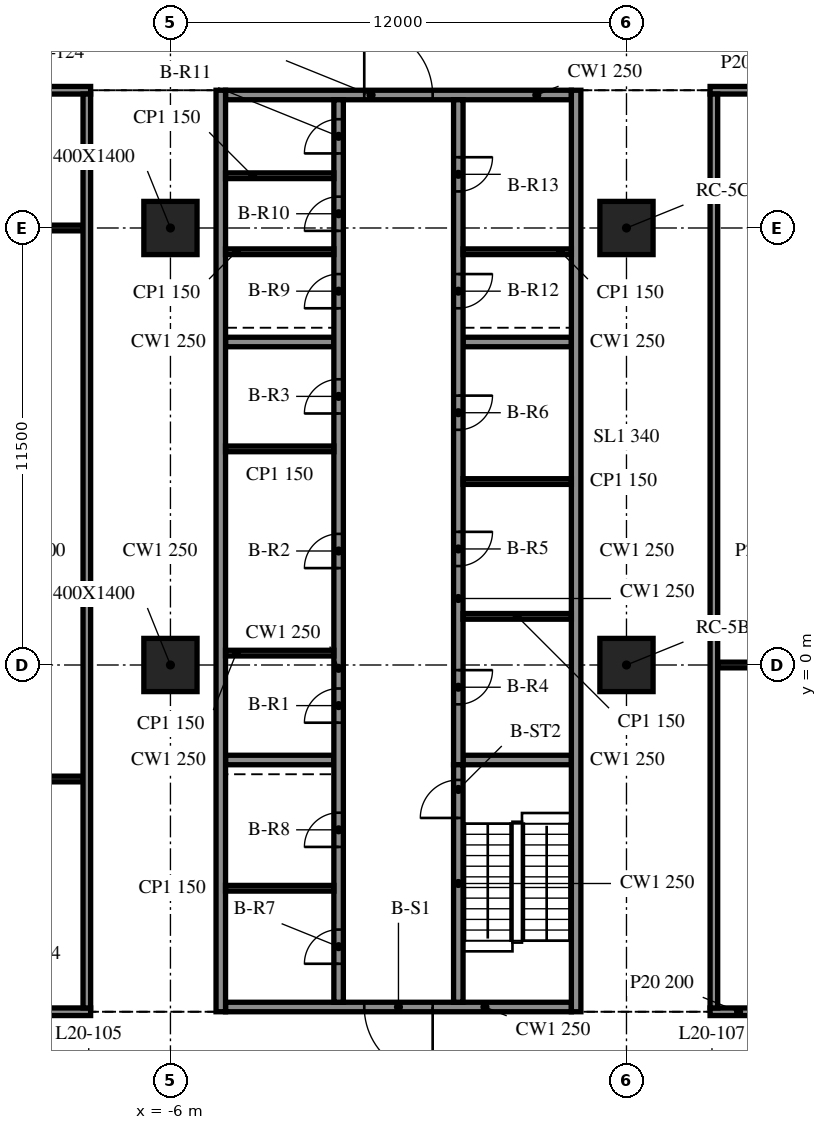
"""IFC4 building model, lengths in metres.
Left out: names, types, materials, properties, quantities, classifications, styles, units other than length and angle.
Written with IfcOpenShell. Run it as: python <this file> out.ifc"""

import sys

from ifc_helpers import new_model, si_unit, direction, frame, frame_2d, origin, origin_2d, place, context, subcontext, project, spatial, rectangle, extrude, element, fill, save


model = new_model("IFC4")
c1 = context("Model", 3, precision=1e-05, world=origin(), true_north=direction((0.0, 1.0)))
c2 = subcontext(c1, "Body", "Model", "MODEL_VIEW")
j1 = project(units=[si_unit("LENGTHUNIT", "METRE"), si_unit("PLANEANGLEUNIT", "RADIAN")], contexts=[c1])
p1 = place(None, origin())
s1 = spatial("IfcSite", under=j1, at=p1, CompositionType="ELEMENT")
p2 = place(p1, origin())
s2 = spatial("IfcBuilding", under=s1, at=p2, CompositionType="ELEMENT")
p3 = place(p2, frame((0.0, 0.0, 88.9)))
s3 = spatial("IfcBuildingStorey", under=s2, at=p3, CompositionType="ELEMENT", Elevation=88.9)
for number, where, z_axis, x_axis in (
    (1, (-6.0, 0.0, -0.34), (0.0, 0.0, 1.0), (1.0, 0.0, 0.0)),
    (2, (-6.0, 11.5, -0.34), (0.0, 0.0, 1.0), (1.0, 0.0, 0.0)),
    (3, (6.0, 0.0, -0.34), (0.0, 0.0, 1.0), (1.0, 0.0, 0.0)),
    (4, (6.0, 11.5, -0.34), (0.0, 0.0, 1.0), (1.0, 0.0, 0.0)),
):
    element("IfcColumn", number, at=place(p3, frame(where, z_axis=z_axis, x_axis=x_axis)), inside=s3, PredefinedType="COLUMN", context=c2, shape_type="SweptSolid", body=[
        extrude(rectangle(XDim=1.4, YDim=1.4, at=origin_2d()), origin(), (0.0, 0.0, 1.0), 4.1),
    ])
for number, where, z_axis, x_axis in (
    (5, (-4.675, 15.125, 0.0), (0.0, 0.0, 1.0), (0.0, -1.0, 0.0)),
    (6, (4.675, -9.125, 0.0), (0.0, 0.0, 1.0), (0.0, 1.0, 0.0)),
):
    element("IfcWall", number, at=place(p3, frame(where, z_axis=z_axis, x_axis=x_axis)), inside=s3, PredefinedType="SOLIDWALL", context=c2, shape_type="SweptSolid", body=[
        extrude(rectangle(XDim=24.25, YDim=0.25, at=frame_2d((12.125, 0.0))), origin(), (0.0, 0.0, 1.0), 3.76),
    ])
p4 = place(p3, frame((4.55, -9.0, 0.0), z_axis=(0.0, 0.0, 1.0), x_axis=(-1.0, 0.0, 0.0)))
e7 = element("IfcWall", 7, at=p4, inside=s3, PredefinedType="SOLIDWALL", context=c2, shape_type="SweptSolid", body=[
    extrude(rectangle(XDim=9.1, YDim=0.25, at=frame_2d((4.55, 0.0))), origin(), (0.0, 0.0, 1.0), 3.76),
])
p5 = place(p4, frame((3.65, 0.0, 0.0)))
e8 = element("IfcOpeningElement", 8, at=p5, cuts=e7, PredefinedType="OPENING", context=c2, shape_type="SweptSolid", body=[
    extrude(rectangle(XDim=1.8, YDim=2.1, at=frame_2d((0.9, 1.05))), frame((0.0, 0.135, 0.0), z_axis=(0.0, -1.0, 0.0), x_axis=(1.0, 0.0, 0.0)), (0.0, 0.0, 1.0), 0.27),
])
p6 = place(p3, frame((-4.55, 15.0, 0.0), z_axis=(0.0, 0.0, 1.0), x_axis=(1.0, 0.0, 0.0)))
e9 = element("IfcWall", 9, at=p6, inside=s3, PredefinedType="SOLIDWALL", context=c2, shape_type="SweptSolid", body=[
    extrude(rectangle(XDim=9.1, YDim=0.25, at=frame_2d((4.55, 0.0))), origin(), (0.0, 0.0, 1.0), 3.76),
])
p7 = place(p6, frame((3.65, 0.0, 0.0)))
e10 = element("IfcOpeningElement", 10, at=p7, cuts=e9, PredefinedType="OPENING", context=c2, shape_type="SweptSolid", body=[
    extrude(rectangle(XDim=1.8, YDim=2.1, at=frame_2d((0.9, 1.05))), frame((0.0, 0.135, 0.0), z_axis=(0.0, -1.0, 0.0), x_axis=(1.0, 0.0, 0.0)), (0.0, 0.0, 1.0), 0.27),
])
p8 = place(p3, frame((-1.575, -8.875, 0.0), z_axis=(0.0, 0.0, 1.0), x_axis=(0.0, 1.0, 0.0)))
e11 = element("IfcWall", 11, at=p8, inside=s3, PredefinedType="SOLIDWALL", context=c2, shape_type="SweptSolid", body=[
    extrude(rectangle(XDim=23.75, YDim=0.25, at=frame_2d((11.875, 0.0))), origin(), (0.0, 0.0, 1.0), 3.76),
])
p9 = place(p8, frame((7.356, 0.0, 0.0)))
e12 = element("IfcOpeningElement", 12, at=p9, cuts=e11, PredefinedType="OPENING", context=c2, shape_type="SweptSolid", body=[
    extrude(rectangle(XDim=0.9, YDim=2.1, at=frame_2d((0.45, 1.05))), frame((0.0, 0.135, 0.0), z_axis=(0.0, -1.0, 0.0), x_axis=(1.0, 0.0, 0.0)), (0.0, 0.0, 1.0), 0.27),
])
p10 = place(p8, frame((11.425, 0.0, 0.0)))
e13 = element("IfcOpeningElement", 13, at=p10, cuts=e11, PredefinedType="OPENING", context=c2, shape_type="SweptSolid", body=[
    extrude(rectangle(XDim=0.9, YDim=2.1, at=frame_2d((0.45, 1.05))), frame((0.0, 0.135, 0.0), z_axis=(0.0, -1.0, 0.0), x_axis=(1.0, 0.0, 0.0)), (0.0, 0.0, 1.0), 0.27),
])
p11 = place(p8, frame((15.494, 0.0, 0.0)))
e14 = element("IfcOpeningElement", 14, at=p11, cuts=e11, PredefinedType="OPENING", context=c2, shape_type="SweptSolid", body=[
    extrude(rectangle(XDim=0.9, YDim=2.1, at=frame_2d((0.45, 1.05))), frame((0.0, 0.135, 0.0), z_axis=(0.0, -1.0, 0.0), x_axis=(1.0, 0.0, 0.0)), (0.0, 0.0, 1.0), 0.27),
])
p12 = place(p8, frame((1.012, 0.0, 0.0)))
e15 = element("IfcOpeningElement", 15, at=p12, cuts=e11, PredefinedType="OPENING", context=c2, shape_type="SweptSolid", body=[
    extrude(rectangle(XDim=0.9, YDim=2.1, at=frame_2d((0.45, 1.05))), frame((0.0, 0.135, 0.0), z_axis=(0.0, -1.0, 0.0), x_axis=(1.0, 0.0, 0.0)), (0.0, 0.0, 1.0), 0.27),
])
p13 = place(p8, frame((4.087, 0.0, 0.0)))
e16 = element("IfcOpeningElement", 16, at=p13, cuts=e11, PredefinedType="OPENING", context=c2, shape_type="SweptSolid", body=[
    extrude(rectangle(XDim=0.9, YDim=2.1, at=frame_2d((0.45, 1.05))), frame((0.0, 0.135, 0.0), z_axis=(0.0, -1.0, 0.0), x_axis=(1.0, 0.0, 0.0)), (0.0, 0.0, 1.0), 0.27),
])
p14 = place(p8, frame((18.262, 0.0, 0.0)))
e17 = element("IfcOpeningElement", 17, at=p14, cuts=e11, PredefinedType="OPENING", context=c2, shape_type="SweptSolid", body=[
    extrude(rectangle(XDim=0.9, YDim=2.1, at=frame_2d((0.45, 1.05))), frame((0.0, 0.135, 0.0), z_axis=(0.0, -1.0, 0.0), x_axis=(1.0, 0.0, 0.0)), (0.0, 0.0, 1.0), 0.27),
])
p15 = place(p8, frame((20.3, 0.0, 0.0)))
e18 = element("IfcOpeningElement", 18, at=p15, cuts=e11, PredefinedType="OPENING", context=c2, shape_type="SweptSolid", body=[
    extrude(rectangle(XDim=0.9, YDim=2.1, at=frame_2d((0.45, 1.05))), frame((0.0, 0.135, 0.0), z_axis=(0.0, -1.0, 0.0), x_axis=(1.0, 0.0, 0.0)), (0.0, 0.0, 1.0), 0.27),
])
p16 = place(p8, frame((22.337, 0.0, 0.0)))
e19 = element("IfcOpeningElement", 19, at=p16, cuts=e11, PredefinedType="OPENING", context=c2, shape_type="SweptSolid", body=[
    extrude(rectangle(XDim=0.9, YDim=2.1, at=frame_2d((0.45, 1.05))), frame((0.0, 0.135, 0.0), z_axis=(0.0, -1.0, 0.0), x_axis=(1.0, 0.0, 0.0)), (0.0, 0.0, 1.0), 0.27),
])
p17 = place(p3, frame((1.575, -8.875, 0.0), z_axis=(0.0, 0.0, 1.0), x_axis=(0.0, 1.0, 0.0)))
e20 = element("IfcWall", 20, at=p17, inside=s3, PredefinedType="SOLIDWALL", context=c2, shape_type="SweptSolid", body=[
    extrude(rectangle(XDim=6.25, YDim=0.25, at=frame_2d((3.125, 0.0))), origin(), (0.0, 0.0, 1.0), 3.76),
])
p18 = place(p17, frame((4.85, 0.0, 0.0)))
e21 = element("IfcOpeningElement", 21, at=p18, cuts=e20, PredefinedType="OPENING", context=c2, shape_type="SweptSolid", body=[
    extrude(rectangle(XDim=1.0, YDim=2.1, at=frame_2d((0.5, 1.05))), frame((0.0, 0.135, 0.0), z_axis=(0.0, -1.0, 0.0), x_axis=(1.0, 0.0, 0.0)), (0.0, 0.0, 1.0), 0.27),
])
p19 = place(p3, frame((1.575, 14.875, 0.0), z_axis=(0.0, 0.0, 1.0), x_axis=(0.0, -1.0, 0.0)))
e22 = element("IfcWall", 22, at=p19, inside=s3, PredefinedType="SOLIDWALL", context=c2, shape_type="SweptSolid", body=[
    extrude(rectangle(XDim=17.5, YDim=0.25, at=frame_2d((8.75, 0.0))), origin(), (0.0, 0.0, 1.0), 3.76),
])
p20 = place(p19, frame((15.01, 0.0, 0.0)))
e23 = element("IfcOpeningElement", 23, at=p20, cuts=e22, PredefinedType="OPENING", context=c2, shape_type="SweptSolid", body=[
    extrude(rectangle(XDim=0.9, YDim=2.1, at=frame_2d((0.45, 1.05))), frame((0.0, 0.135, 0.0), z_axis=(0.0, -1.0, 0.0), x_axis=(1.0, 0.0, 0.0)), (0.0, 0.0, 1.0), 0.27),
])
p21 = place(p19, frame((11.371, 0.0, 0.0)))
e24 = element("IfcOpeningElement", 24, at=p21, cuts=e22, PredefinedType="OPENING", context=c2, shape_type="SweptSolid", body=[
    extrude(rectangle(XDim=0.9, YDim=2.1, at=frame_2d((0.45, 1.05))), frame((0.0, 0.135, 0.0), z_axis=(0.0, -1.0, 0.0), x_axis=(1.0, 0.0, 0.0)), (0.0, 0.0, 1.0), 0.27),
])
p22 = place(p19, frame((7.786, 0.0, 0.0)))
e25 = element("IfcOpeningElement", 25, at=p22, cuts=e22, PredefinedType="OPENING", context=c2, shape_type="SweptSolid", body=[
    extrude(rectangle(XDim=0.9, YDim=2.1, at=frame_2d((0.45, 1.05))), frame((0.0, 0.135, 0.0), z_axis=(0.0, -1.0, 0.0), x_axis=(1.0, 0.0, 0.0)), (0.0, 0.0, 1.0), 0.27),
])
p23 = place(p19, frame((4.587, 0.0, 0.0)))
e26 = element("IfcOpeningElement", 26, at=p23, cuts=e22, PredefinedType="OPENING", context=c2, shape_type="SweptSolid", body=[
    extrude(rectangle(XDim=0.9, YDim=2.1, at=frame_2d((0.45, 1.05))), frame((0.0, 0.135, 0.0), z_axis=(0.0, -1.0, 0.0), x_axis=(1.0, 0.0, 0.0)), (0.0, 0.0, 1.0), 0.27),
])
p24 = place(p19, frame((1.512, 0.0, 0.0)))
e27 = element("IfcOpeningElement", 27, at=p24, cuts=e22, PredefinedType="OPENING", context=c2, shape_type="SweptSolid", body=[
    extrude(rectangle(XDim=0.9, YDim=2.1, at=frame_2d((0.45, 1.05))), frame((0.0, 0.135, 0.0), z_axis=(0.0, -1.0, 0.0), x_axis=(1.0, 0.0, 0.0)), (0.0, 0.0, 1.0), 0.27),
])
for number, where, z_axis, x_axis in (
    (28, (-4.55, -2.5, 0.0), (0.0, 0.0, 1.0), (1.0, 0.0, 0.0)),
    (29, (-4.55, 8.5, 0.0), (0.0, 0.0, 1.0), (1.0, 0.0, 0.0)),
    (30, (1.7, -2.5, 0.0), (0.0, 0.0, 1.0), (1.0, 0.0, 0.0)),
    (31, (1.7, 8.5, 0.0), (0.0, 0.0, 1.0), (1.0, 0.0, 0.0)),
):
    element("IfcWall", number, at=place(p3, frame(where, z_axis=z_axis, x_axis=x_axis)), inside=s3, PredefinedType="SOLIDWALL", context=c2, shape_type="SweptSolid", body=[
        extrude(rectangle(XDim=2.85, YDim=0.25, at=frame_2d((1.425, 0.0))), origin(), (0.0, 0.0, 1.0), 3.76),
    ])
for number, where, z_axis, x_axis in (
    (32, (-4.55, 0.312, 0.0), (0.0, 0.0, 1.0), (1.0, 0.0, 0.0)),
    (33, (-4.55, 5.688, 0.0), (0.0, 0.0, 1.0), (1.0, 0.0, 0.0)),
    (34, (1.7, 1.28, 0.0), (0.0, 0.0, 1.0), (1.0, 0.0, 0.0)),
    (35, (1.7, 4.827, 0.0), (0.0, 0.0, 1.0), (1.0, 0.0, 0.0)),
    (36, (-4.55, -5.875, 0.0), (0.0, 0.0, 1.0), (1.0, 0.0, 0.0)),
    (37, (-4.55, 10.875, 0.0), (0.0, 0.0, 1.0), (1.0, 0.0, 0.0)),
    (38, (-4.55, 12.875, 0.0), (0.0, 0.0, 1.0), (1.0, 0.0, 0.0)),
    (39, (1.7, 10.875, 0.0), (0.0, 0.0, 1.0), (1.0, 0.0, 0.0)),
):
    element("IfcWall", number, at=place(p3, frame(where, z_axis=z_axis, x_axis=x_axis)), inside=s3, PredefinedType="PARTITIONING", context=c2, shape_type="SweptSolid", body=[
        extrude(rectangle(XDim=2.85, YDim=0.15, at=frame_2d((1.425, 0.0))), origin(), (0.0, 0.0, 1.0), 3.76),
    ])
p25 = place(p3, frame((-16.0, -9.125, 0.0), z_axis=(0.0, 0.0, 1.0), x_axis=(1.0, 0.0, 0.0)))
e40 = element("IfcWall", 40, at=p25, inside=s3, PredefinedType="PARTITIONING", context=c2, shape_type="SweptSolid", body=[
    extrude(rectangle(XDim=7.9, YDim=0.2, at=frame_2d((3.95, 0.0))), origin(), (0.0, 0.0, 1.0), 3.76),
])
p26 = place(p25, frame((3.5, 0.0, 0.0)))
e41 = element("IfcOpeningElement", 41, at=p26, cuts=e40, PredefinedType="OPENING", context=c2, shape_type="SweptSolid", body=[
    extrude(rectangle(XDim=1.0, YDim=2.1, at=frame_2d((0.5, 1.05))), frame((0.0, 0.11, 0.0), z_axis=(0.0, -1.0, 0.0), x_axis=(1.0, 0.0, 0.0)), (0.0, 0.0, 1.0), 0.22),
])
p27 = place(p3, frame((8.2, -9.125, 0.0), z_axis=(0.0, 0.0, 1.0), x_axis=(1.0, 0.0, 0.0)))
e42 = element("IfcWall", 42, at=p27, inside=s3, PredefinedType="PARTITIONING", context=c2, shape_type="SweptSolid", body=[
    extrude(rectangle(XDim=7.5, YDim=0.2, at=frame_2d((3.75, 0.0))), origin(), (0.0, 0.0, 1.0), 3.76),
])
p28 = place(p27, frame((3.3, 0.0, 0.0)))
e43 = element("IfcOpeningElement", 43, at=p28, cuts=e42, PredefinedType="OPENING", context=c2, shape_type="SweptSolid", body=[
    extrude(rectangle(XDim=1.0, YDim=2.1, at=frame_2d((0.5, 1.05))), frame((0.0, 0.11, 0.0), z_axis=(0.0, -1.0, 0.0), x_axis=(1.0, 0.0, 0.0)), (0.0, 0.0, 1.0), 0.22),
])
p29 = place(p3, frame((-15.8, -3.0, 0.0), z_axis=(0.0, 0.0, 1.0), x_axis=(1.0, 0.0, 0.0)))
e44 = element("IfcWall", 44, at=p29, inside=s3, PredefinedType="PARTITIONING", context=c2, shape_type="SweptSolid", body=[
    extrude(rectangle(XDim=7.5, YDim=0.15, at=frame_2d((3.75, 0.0))), origin(), (0.0, 0.0, 1.0), 3.76),
])
p30 = place(p3, frame((8.4, 0.0, 0.0), z_axis=(0.0, 0.0, 1.0), x_axis=(1.0, 0.0, 0.0)))
e45 = element("IfcWall", 45, at=p30, inside=s3, PredefinedType="PARTITIONING", context=c2, shape_type="SweptSolid", body=[
    extrude(rectangle(XDim=7.1, YDim=0.15, at=frame_2d((3.55, 0.0))), origin(), (0.0, 0.0, 1.0), 3.76),
])
p31 = place(p3, frame((-15.8, 11.5, 0.0), z_axis=(0.0, 0.0, 1.0), x_axis=(1.0, 0.0, 0.0)))
e46 = element("IfcWall", 46, at=p31, inside=s3, PredefinedType="PARTITIONING", context=c2, shape_type="SweptSolid", body=[
    extrude(rectangle(XDim=7.5, YDim=0.15, at=frame_2d((3.75, 0.0))), origin(), (0.0, 0.0, 1.0), 3.76),
])
p32 = place(p3, frame((-16.0, 15.125, 0.0), z_axis=(0.0, 0.0, 1.0), x_axis=(1.0, 0.0, 0.0)))
e47 = element("IfcWall", 47, at=p32, inside=s3, PredefinedType="PARTITIONING", context=c2, shape_type="SweptSolid", body=[
    extrude(rectangle(XDim=7.9, YDim=0.2, at=frame_2d((3.95, 0.0))), origin(), (0.0, 0.0, 1.0), 3.76),
])
p33 = place(p32, frame((3.5, 0.0, 0.0)))
e48 = element("IfcOpeningElement", 48, at=p33, cuts=e47, PredefinedType="OPENING", context=c2, shape_type="SweptSolid", body=[
    extrude(rectangle(XDim=1.0, YDim=2.1, at=frame_2d((0.5, 1.05))), frame((0.0, 0.11, 0.0), z_axis=(0.0, -1.0, 0.0), x_axis=(1.0, 0.0, 0.0)), (0.0, 0.0, 1.0), 0.22),
])
p34 = place(p3, frame((8.2, 15.125, 0.0), z_axis=(0.0, 0.0, 1.0), x_axis=(1.0, 0.0, 0.0)))
e49 = element("IfcWall", 49, at=p34, inside=s3, PredefinedType="PARTITIONING", context=c2, shape_type="SweptSolid", body=[
    extrude(rectangle(XDim=7.5, YDim=0.2, at=frame_2d((3.75, 0.0))), origin(), (0.0, 0.0, 1.0), 3.76),
])
p35 = place(p34, frame((3.3, 0.0, 0.0)))
e50 = element("IfcOpeningElement", 50, at=p35, cuts=e49, PredefinedType="OPENING", context=c2, shape_type="SweptSolid", body=[
    extrude(rectangle(XDim=0.9, YDim=2.1, at=frame_2d((0.45, 1.05))), frame((0.0, 0.11, 0.0), z_axis=(0.0, -1.0, 0.0), x_axis=(1.0, 0.0, 0.0)), (0.0, 0.0, 1.0), 0.22),
])
for number, where, z_axis, x_axis in (
    (51, (-8.2, -9.025, 0.0), (0.0, 0.0, 1.0), (0.0, 1.0, 0.0)),
    (52, (8.3, -9.025, 0.0), (0.0, 0.0, 1.0), (0.0, 1.0, 0.0)),
):
    element("IfcWall", number, at=place(p3, frame(where, z_axis=z_axis, x_axis=x_axis)), inside=s3, PredefinedType="PARTITIONING", context=c2, shape_type="SweptSolid", body=[
        extrude(rectangle(XDim=24.05, YDim=0.2, at=frame_2d((12.025, 0.0))), origin(), (0.0, 0.0, 1.0), 3.76),
    ])
p36 = place(p5, origin())
e53 = element("IfcDoor", 53, at=p36, inside=s3, OperationType="DOUBLE_DOOR_SINGLE_SWING", PredefinedType="DOOR", context=c2, shape_type="SweptSolid", body=[
    extrude(rectangle(XDim=1.8, YDim=2.1, at=frame_2d((0.9, 1.05))), frame((0.0, 0.025, 0.0), z_axis=(0.0, -1.0, 0.0), x_axis=(1.0, 0.0, 0.0)), (0.0, 0.0, 1.0), 0.05),
])
fill(e8, e53)
p37 = place(p7, origin())
e54 = element("IfcDoor", 54, at=p37, inside=s3, OperationType="DOUBLE_DOOR_SINGLE_SWING", PredefinedType="DOOR", context=c2, shape_type="SweptSolid", body=[
    extrude(rectangle(XDim=1.8, YDim=2.1, at=frame_2d((0.9, 1.05))), frame((0.0, 0.025, 0.0), z_axis=(0.0, -1.0, 0.0), x_axis=(1.0, 0.0, 0.0)), (0.0, 0.0, 1.0), 0.05),
])
fill(e10, e54)
p38 = place(p9, origin())
e55 = element("IfcDoor", 55, at=p38, inside=s3, OperationType="SINGLE_SWING_LEFT", PredefinedType="DOOR", context=c2, shape_type="SweptSolid", body=[
    extrude(rectangle(XDim=0.9, YDim=2.1, at=frame_2d((0.45, 1.05))), frame((0.0, 0.025, 0.0), z_axis=(0.0, -1.0, 0.0), x_axis=(1.0, 0.0, 0.0)), (0.0, 0.0, 1.0), 0.05),
])
fill(e12, e55)
p39 = place(p10, origin())
e56 = element("IfcDoor", 56, at=p39, inside=s3, OperationType="SINGLE_SWING_RIGHT", PredefinedType="DOOR", context=c2, shape_type="SweptSolid", body=[
    extrude(rectangle(XDim=0.9, YDim=2.1, at=frame_2d((0.45, 1.05))), frame((0.0, 0.025, 0.0), z_axis=(0.0, -1.0, 0.0), x_axis=(1.0, 0.0, 0.0)), (0.0, 0.0, 1.0), 0.05),
])
fill(e13, e56)
p40 = place(p11, origin())
e57 = element("IfcDoor", 57, at=p40, inside=s3, OperationType="SINGLE_SWING_LEFT", PredefinedType="DOOR", context=c2, shape_type="SweptSolid", body=[
    extrude(rectangle(XDim=0.9, YDim=2.1, at=frame_2d((0.45, 1.05))), frame((0.0, 0.025, 0.0), z_axis=(0.0, -1.0, 0.0), x_axis=(1.0, 0.0, 0.0)), (0.0, 0.0, 1.0), 0.05),
])
fill(e14, e57)
p41 = place(p20, origin())
e58 = element("IfcDoor", 58, at=p41, inside=s3, OperationType="SINGLE_SWING_RIGHT", PredefinedType="DOOR", context=c2, shape_type="SweptSolid", body=[
    extrude(rectangle(XDim=0.9, YDim=2.1, at=frame_2d((0.45, 1.05))), frame((0.0, 0.025, 0.0), z_axis=(0.0, -1.0, 0.0), x_axis=(1.0, 0.0, 0.0)), (0.0, 0.0, 1.0), 0.05),
])
fill(e23, e58)
p42 = place(p21, origin())
e59 = element("IfcDoor", 59, at=p42, inside=s3, OperationType="SINGLE_SWING_LEFT", PredefinedType="DOOR", context=c2, shape_type="SweptSolid", body=[
    extrude(rectangle(XDim=0.9, YDim=2.1, at=frame_2d((0.45, 1.05))), frame((0.0, 0.025, 0.0), z_axis=(0.0, -1.0, 0.0), x_axis=(1.0, 0.0, 0.0)), (0.0, 0.0, 1.0), 0.05),
])
fill(e24, e59)
p43 = place(p22, origin())
e60 = element("IfcDoor", 60, at=p43, inside=s3, OperationType="SINGLE_SWING_RIGHT", PredefinedType="DOOR", context=c2, shape_type="SweptSolid", body=[
    extrude(rectangle(XDim=0.9, YDim=2.1, at=frame_2d((0.45, 1.05))), frame((0.0, 0.025, 0.0), z_axis=(0.0, -1.0, 0.0), x_axis=(1.0, 0.0, 0.0)), (0.0, 0.0, 1.0), 0.05),
])
fill(e25, e60)
p44 = place(p12, origin())
e61 = element("IfcDoor", 61, at=p44, inside=s3, OperationType="SINGLE_SWING_LEFT", PredefinedType="DOOR", context=c2, shape_type="SweptSolid", body=[
    extrude(rectangle(XDim=0.9, YDim=2.1, at=frame_2d((0.45, 1.05))), frame((0.0, 0.025, 0.0), z_axis=(0.0, -1.0, 0.0), x_axis=(1.0, 0.0, 0.0)), (0.0, 0.0, 1.0), 0.05),
])
fill(e15, e61)
p45 = place(p13, origin())
e62 = element("IfcDoor", 62, at=p45, inside=s3, OperationType="SINGLE_SWING_RIGHT", PredefinedType="DOOR", context=c2, shape_type="SweptSolid", body=[
    extrude(rectangle(XDim=0.9, YDim=2.1, at=frame_2d((0.45, 1.05))), frame((0.0, 0.025, 0.0), z_axis=(0.0, -1.0, 0.0), x_axis=(1.0, 0.0, 0.0)), (0.0, 0.0, 1.0), 0.05),
])
fill(e16, e62)
p46 = place(p14, origin())
e63 = element("IfcDoor", 63, at=p46, inside=s3, OperationType="SINGLE_SWING_LEFT", PredefinedType="DOOR", context=c2, shape_type="SweptSolid", body=[
    extrude(rectangle(XDim=0.9, YDim=2.1, at=frame_2d((0.45, 1.05))), frame((0.0, 0.025, 0.0), z_axis=(0.0, -1.0, 0.0), x_axis=(1.0, 0.0, 0.0)), (0.0, 0.0, 1.0), 0.05),
])
fill(e17, e63)
p47 = place(p15, origin())
e64 = element("IfcDoor", 64, at=p47, inside=s3, OperationType="SINGLE_SWING_RIGHT", PredefinedType="DOOR", context=c2, shape_type="SweptSolid", body=[
    extrude(rectangle(XDim=0.9, YDim=2.1, at=frame_2d((0.45, 1.05))), frame((0.0, 0.025, 0.0), z_axis=(0.0, -1.0, 0.0), x_axis=(1.0, 0.0, 0.0)), (0.0, 0.0, 1.0), 0.05),
])
fill(e18, e64)
p48 = place(p16, origin())
e65 = element("IfcDoor", 65, at=p48, inside=s3, OperationType="SINGLE_SWING_LEFT", PredefinedType="DOOR", context=c2, shape_type="SweptSolid", body=[
    extrude(rectangle(XDim=0.9, YDim=2.1, at=frame_2d((0.45, 1.05))), frame((0.0, 0.025, 0.0), z_axis=(0.0, -1.0, 0.0), x_axis=(1.0, 0.0, 0.0)), (0.0, 0.0, 1.0), 0.05),
])
fill(e19, e65)
p49 = place(p23, origin())
e66 = element("IfcDoor", 66, at=p49, inside=s3, OperationType="SINGLE_SWING_RIGHT", PredefinedType="DOOR", context=c2, shape_type="SweptSolid", body=[
    extrude(rectangle(XDim=0.9, YDim=2.1, at=frame_2d((0.45, 1.05))), frame((0.0, 0.025, 0.0), z_axis=(0.0, -1.0, 0.0), x_axis=(1.0, 0.0, 0.0)), (0.0, 0.0, 1.0), 0.05),
])
fill(e26, e66)
p50 = place(p24, origin())
e67 = element("IfcDoor", 67, at=p50, inside=s3, OperationType="SINGLE_SWING_LEFT", PredefinedType="DOOR", context=c2, shape_type="SweptSolid", body=[
    extrude(rectangle(XDim=0.9, YDim=2.1, at=frame_2d((0.45, 1.05))), frame((0.0, 0.025, 0.0), z_axis=(0.0, -1.0, 0.0), x_axis=(1.0, 0.0, 0.0)), (0.0, 0.0, 1.0), 0.05),
])
fill(e27, e67)
p51 = place(p18, origin())
e68 = element("IfcDoor", 68, at=p51, inside=s3, OperationType="SINGLE_SWING_RIGHT", PredefinedType="DOOR", context=c2, shape_type="SweptSolid", body=[
    extrude(rectangle(XDim=1.0, YDim=2.1, at=frame_2d((0.5, 1.05))), frame((0.0, 0.025, 0.0), z_axis=(0.0, -1.0, 0.0), x_axis=(1.0, 0.0, 0.0)), (0.0, 0.0, 1.0), 0.05),
])
fill(e21, e68)
save(model, sys.argv[1])
